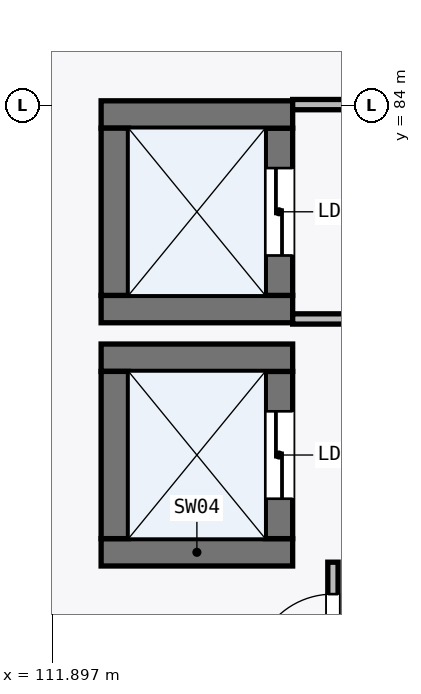
"""IFC4 building model, lengths in metres.
Left out: names, types, materials, properties, quantities, classifications, styles, units other than length and angle.
Written with IfcOpenShell. Run it as: python <this file> out.ifc"""

import sys

from ifc_helpers import new_model, si_unit, direction, frame, frame_2d, origin, place, context, subcontext, project, spatial, rectangle, extrude, element, fill, save


model = new_model("IFC4")
c1 = context("Model", 3, precision=1e-05, world=origin(), true_north=direction((0.0, 1.0)))
c2 = subcontext(c1, "Body", "Model", "MODEL_VIEW")
j1 = project(units=[si_unit("LENGTHUNIT", "METRE"), si_unit("PLANEANGLEUNIT", "RADIAN")], contexts=[c1])
p1 = place(None, origin())
s1 = spatial("IfcSite", under=j1, at=p1, CompositionType="ELEMENT")
p2 = place(p1, origin())
s2 = spatial("IfcBuilding", under=s1, at=p2, CompositionType="ELEMENT")
p3 = place(p2, frame((0.0, 0.0, 26.7)))
s3 = spatial("IfcBuildingStorey", under=s2, at=p3, CompositionType="ELEMENT", Elevation=26.7)
p4 = place(p3, frame((112.54, 78.12, 0.0), z_axis=(0.0, 0.0, 1.0), x_axis=(1.0, 0.0, 0.0)))
e1 = element("IfcWall", 1, at=p4, inside=s3, PredefinedType="SHEAR", context=c2, shape_type="SweptSolid", body=[
    extrude(rectangle(XDim=2.52, YDim=0.36, at=frame_2d((1.26, 0.0))), origin(), (0.0, 0.0, 1.0), 4.845),
])
p5 = place(p3, frame((114.88, 78.3, 0.0), z_axis=(0.0, 0.0, 1.0), x_axis=(0.0, 1.0, 0.0)))
e2 = element("IfcWall", 2, at=p5, inside=s3, PredefinedType="SHEAR", context=c2, shape_type="SweptSolid", body=[
    extrude(rectangle(XDim=2.2, YDim=0.36, at=frame_2d((1.1, 0.0))), origin(), (0.0, 0.0, 1.0), 4.845),
])
p6 = place(p5, frame((0.525, 0.0, 0.0)))
e3 = element("IfcOpeningElement", 3, at=p6, cuts=e2, PredefinedType="OPENING", context=c2, shape_type="SweptSolid", body=[
    extrude(rectangle(XDim=1.15, YDim=2.2, at=frame_2d((0.575, 1.1))), frame((0.0, 0.19, 0.0), z_axis=(0.0, -1.0, 0.0), x_axis=(1.0, 0.0, 0.0)), (0.0, 0.0, 1.0), 0.38),
])
p7 = place(p3, frame((115.06, 80.68, 0.0), z_axis=(0.0, 0.0, 1.0), x_axis=(-1.0, 0.0, 0.0)))
e4 = element("IfcWall", 4, at=p7, inside=s3, PredefinedType="SHEAR", context=c2, shape_type="SweptSolid", body=[
    extrude(rectangle(XDim=2.52, YDim=0.36, at=frame_2d((1.26, 0.0))), origin(), (0.0, 0.0, 1.0), 4.845),
])
p8 = place(p3, frame((112.72, 80.5, 0.0), z_axis=(0.0, 0.0, 1.0), x_axis=(0.0, -1.0, 0.0)))
e5 = element("IfcWall", 5, at=p8, inside=s3, PredefinedType="SHEAR", context=c2, shape_type="SweptSolid", body=[
    extrude(rectangle(XDim=2.2, YDim=0.36, at=frame_2d((1.1, 0.0))), origin(), (0.0, 0.0, 1.0), 4.845),
])
p9 = place(p3, frame((112.54, 81.32, 0.0), z_axis=(0.0, 0.0, 1.0), x_axis=(1.0, 0.0, 0.0)))
e6 = element("IfcWall", 6, at=p9, inside=s3, PredefinedType="SHEAR", context=c2, shape_type="SweptSolid", body=[
    extrude(rectangle(XDim=2.52, YDim=0.36, at=frame_2d((1.26, 0.0))), origin(), (0.0, 0.0, 1.0), 4.845),
])
p10 = place(p3, frame((114.88, 81.5, 0.0), z_axis=(0.0, 0.0, 1.0), x_axis=(0.0, 1.0, 0.0)))
e7 = element("IfcWall", 7, at=p10, inside=s3, PredefinedType="SHEAR", context=c2, shape_type="SweptSolid", body=[
    extrude(rectangle(XDim=2.2, YDim=0.36, at=frame_2d((1.1, 0.0))), origin(), (0.0, 0.0, 1.0), 4.845),
])
p11 = place(p10, frame((0.525, 0.0, 0.0)))
e8 = element("IfcOpeningElement", 8, at=p11, cuts=e7, PredefinedType="OPENING", context=c2, shape_type="SweptSolid", body=[
    extrude(rectangle(XDim=1.15, YDim=2.2, at=frame_2d((0.575, 1.1))), frame((0.0, 0.19, 0.0), z_axis=(0.0, -1.0, 0.0), x_axis=(1.0, 0.0, 0.0)), (0.0, 0.0, 1.0), 0.38),
])
p12 = place(p3, frame((115.06, 83.88, 0.0), z_axis=(0.0, 0.0, 1.0), x_axis=(-1.0, 0.0, 0.0)))
e9 = element("IfcWall", 9, at=p12, inside=s3, PredefinedType="SHEAR", context=c2, shape_type="SweptSolid", body=[
    extrude(rectangle(XDim=2.52, YDim=0.36, at=frame_2d((1.26, 0.0))), origin(), (0.0, 0.0, 1.0), 4.845),
])
p13 = place(p3, frame((112.72, 83.7, 0.0), z_axis=(0.0, 0.0, 1.0), x_axis=(0.0, -1.0, 0.0)))
e10 = element("IfcWall", 10, at=p13, inside=s3, PredefinedType="SHEAR", context=c2, shape_type="SweptSolid", body=[
    extrude(rectangle(XDim=2.2, YDim=0.36, at=frame_2d((1.1, 0.0))), origin(), (0.0, 0.0, 1.0), 4.845),
])
p14 = place(p3, frame((115.59, 76.1, 0.0), z_axis=(0.0, 0.0, 1.0), x_axis=(0.0, 1.0, 0.0)))
e11 = element("IfcWall", 11, at=p14, inside=s3, PredefinedType="PARTITIONING", context=c2, shape_type="SweptSolid", body=[
    extrude(rectangle(XDim=1.89, YDim=0.135, at=frame_2d((0.945, 0.0))), origin(), (0.0, 0.0, 1.0), 4.845),
])
p15 = place(p14, frame((0.42, 0.0, 0.0)))
e12 = element("IfcOpeningElement", 12, at=p15, cuts=e11, PredefinedType="OPENING", context=c2, shape_type="SweptSolid", body=[
    extrude(rectangle(XDim=1.05, YDim=2.1, at=frame_2d((0.525, 1.05))), frame((0.0, 0.078, 0.0), z_axis=(0.0, -1.0, 0.0), x_axis=(1.0, 0.0, 0.0)), (0.0, 0.0, 1.0), 0.155),
])
p16 = place(p3, frame((115.99, 81.19, 0.0), z_axis=(0.0, 0.0, 1.0), x_axis=(-1.0, 0.0, 0.0)))
e13 = element("IfcWall", 13, at=p16, inside=s3, PredefinedType="PARTITIONING", context=c2, shape_type="SweptSolid", body=[
    extrude(rectangle(XDim=0.93, YDim=0.135, at=frame_2d((0.465, 0.0))), origin(), (0.0, 0.0, 1.0), 4.845),
])
p17 = place(p3, frame((115.06, 84.01, 0.0), z_axis=(0.0, 0.0, 1.0), x_axis=(1.0, 0.0, 0.0)))
e14 = element("IfcWall", 14, at=p17, inside=s3, PredefinedType="PARTITIONING", context=c2, shape_type="SweptSolid", body=[
    extrude(rectangle(XDim=0.93, YDim=0.135, at=frame_2d((0.465, 0.0))), origin(), (0.0, 0.0, 1.0), 4.237),
])
p18 = place(p6, frame((1.15, 0.0, 0.0), z_axis=(0.0, 0.0, 1.0), x_axis=(-1.0, 0.0, 0.0)))
e15 = element("IfcDoor", 15, at=p18, inside=s3, OperationType="DOUBLE_DOOR_SLIDING", PredefinedType="DOOR", context=c2, shape_type="SweptSolid", body=[
    extrude(rectangle(XDim=1.15, YDim=2.2, at=frame_2d((0.575, 1.1))), frame((0.0, 0.025, 0.0), z_axis=(0.0, -1.0, 0.0), x_axis=(1.0, 0.0, 0.0)), (0.0, 0.0, 1.0), 0.05),
])
fill(e3, e15)
p19 = place(p11, frame((1.15, 0.0, 0.0), z_axis=(0.0, 0.0, 1.0), x_axis=(-1.0, 0.0, 0.0)))
e16 = element("IfcDoor", 16, at=p19, inside=s3, OperationType="DOUBLE_DOOR_SLIDING", PredefinedType="DOOR", context=c2, shape_type="SweptSolid", body=[
    extrude(rectangle(XDim=1.15, YDim=2.2, at=frame_2d((0.575, 1.1))), frame((0.0, 0.025, 0.0), z_axis=(0.0, -1.0, 0.0), x_axis=(1.0, 0.0, 0.0)), (0.0, 0.0, 1.0), 0.05),
])
fill(e8, e16)
p20 = place(p15, origin())
e17 = element("IfcDoor", 17, at=p20, inside=s3, OperationType="SINGLE_SWING_LEFT", PredefinedType="DOOR", context=c2, shape_type="SweptSolid", body=[
    extrude(rectangle(XDim=1.05, YDim=2.1, at=frame_2d((0.525, 1.05))), frame((0.0, 0.025, 0.0), z_axis=(0.0, -1.0, 0.0), x_axis=(1.0, 0.0, 0.0)), (0.0, 0.0, 1.0), 0.05),
])
fill(e12, e17)
save(model, sys.argv[1])
